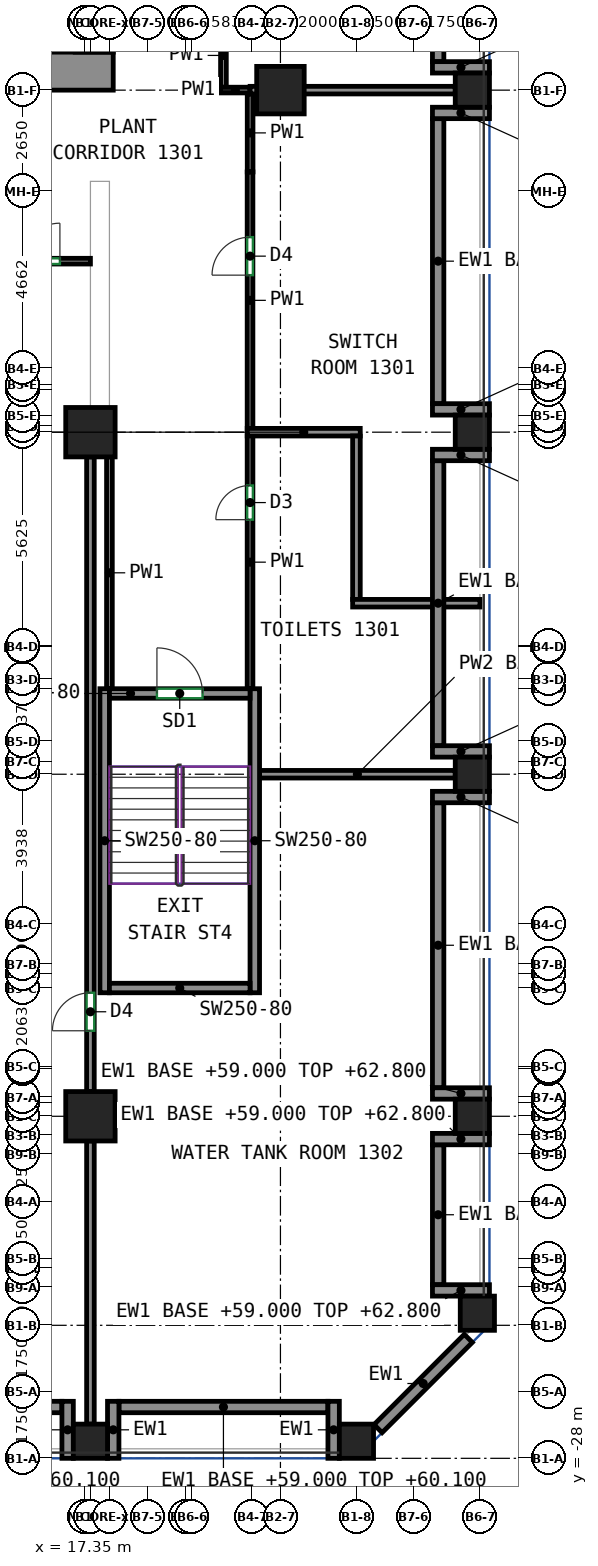
"""IFC4 building model, lengths in metres.
Left out: names, types, materials, properties, quantities, classifications, styles, units other than length and angle.
Written with IfcOpenShell. Run it as: python <this file> out.ifc"""

import sys

from ifc_helpers import new_model, si_unit, direction, frame, frame_2d, origin, origin_2d, place, context, subcontext, project, spatial, rectangle, extrude, source, transform, mapped, element, fill, save


model = new_model("IFC4")
c1 = context("Model", 3, precision=1e-05, world=origin(), true_north=direction((0.0, 1.0)))
c2 = subcontext(c1, "Body", "Model", "MODEL_VIEW")
j1 = project(units=[si_unit("LENGTHUNIT", "METRE"), si_unit("PLANEANGLEUNIT", "RADIAN")], contexts=[c1])
p1 = place(None, origin())
s1 = spatial("IfcSite", under=j1, at=p1, CompositionType="ELEMENT")
p2 = place(p1, origin())
s2 = spatial("IfcBuilding", under=s1, at=p2, CompositionType="ELEMENT")
p3 = place(p2, frame((0.0, 0.0, 59.0)))
s3 = spatial("IfcBuildingStorey", under=s2, at=p3, CompositionType="ELEMENT", Elevation=59.0)
m1 = source(origin(), c2, "Body", "SweptSolid", [
    extrude(rectangle(XDim=0.9, YDim=0.9, at=origin_2d()), origin(), (0.0, 0.0, 1.0), 2.3),
])
p4 = place(p3, frame((17.5, -27.55, 0.0), z_axis=(0.0, 0.0, 1.0), x_axis=(1.0, 0.0, 0.0)))
e1 = element("IfcColumn", 1, at=p4, inside=s3, PredefinedType="COLUMN", context=c2, shape_type="MappedRepresentation", body=[
    mapped(m1, transform((0.0, 0.0, 0.0))),
])
m2 = source(origin(), c2, "Body", "SweptSolid", [
    extrude(rectangle(XDim=1.3, YDim=1.3, at=origin_2d()), origin(), (0.0, 0.0, 1.0), 2.3),
])
for number, where, z_axis, x_axis in (
    (2, (17.5, -19.0, 0.0), (0.0, 0.0, 1.0), (1.0, 0.0, 0.0)),
    (3, (17.5, -1.0, 0.0), (0.0, 0.0, 1.0), (1.0, 0.0, 0.0)),
):
    element("IfcColumn", number, at=place(p3, frame(where, z_axis=z_axis, x_axis=x_axis)), inside=s3, PredefinedType="COLUMN", context=c2, shape_type="MappedRepresentation", body=[
        mapped(m2, transform((0.0, 0.0, 0.0))),
    ])
for number, where, z_axis, x_axis in (
    (4, (24.5, -27.55, 0.0), (0.0, 0.0, 1.0), (1.0, 0.0, 0.0)),
    (5, (27.55, -19.0, 0.0), (0.0, 0.0, 1.0), (1.0, 0.0, 0.0)),
    (6, (27.55, -10.0, 0.0), (0.0, 0.0, 1.0), (1.0, 0.0, 0.0)),
    (7, (27.55, -1.0, 0.0), (0.0, 0.0, 1.0), (1.0, 0.0, 0.0)),
):
    element("IfcColumn", number, at=place(p3, frame(where, z_axis=z_axis, x_axis=x_axis)), inside=s3, PredefinedType="COLUMN", context=c2, shape_type="MappedRepresentation", body=[
        mapped(m1, transform((0.0, 0.0, 0.0))),
    ])
m3 = source(origin(), c2, "Body", "SweptSolid", [
    extrude(rectangle(XDim=0.9, YDim=0.9, at=origin_2d()), origin(), (0.0, 0.0, 1.0), 3.8),
])
for number, where, z_axis, x_axis in (
    (8, (27.55, 8.0, 0.0), (0.0, 0.0, 1.0), (1.0, 0.0, 0.0)),
    (9, (27.682, -24.182, 0.0), (0.0, 0.0, 1.0), (1.0, 0.0, 0.0)),
):
    element("IfcColumn", number, at=place(p3, frame(where, z_axis=z_axis, x_axis=x_axis)), inside=s3, PredefinedType="COLUMN", context=c2, shape_type="MappedRepresentation", body=[
        mapped(m3, transform((0.0, 0.0, 0.0))),
    ])
m4 = source(origin(), c2, "Body", "SweptSolid", [
    extrude(rectangle(XDim=1.25, YDim=1.25, at=origin_2d()), origin(), (0.0, 0.0, 1.0), 3.8),
])
p5 = place(p3, frame((22.5, 8.0, 0.0), z_axis=(0.0, 0.0, 1.0), x_axis=(1.0, 0.0, 0.0)))
e10 = element("IfcColumn", 10, at=p5, inside=s3, PredefinedType="COLUMN", context=c2, shape_type="MappedRepresentation", body=[
    mapped(m4, transform((0.0, 0.0, 0.0))),
])
m5 = source(origin(), c2, "Body", "SweptSolid", [
    extrude(rectangle(XDim=5.63, YDim=1.0, at=frame_2d((2.815, 0.0))), origin(), (0.0, 0.0, 1.0), 3.8),
])
p6 = place(p3, frame((12.47, 8.5, 0.0), z_axis=(0.0, 0.0, 1.0), x_axis=(1.0, 0.0, 0.0)))
e11 = element("IfcWall", 11, at=p6, inside=s3, PredefinedType="SHEAR", context=c2, shape_type="MappedRepresentation", body=[
    mapped(m5, transform((0.0, 0.0, 0.0))),
])
p7 = place(p6, frame((2.18, 0.0, 0.0)))
e12 = element("IfcOpeningElement", 12, at=p7, cuts=e11, PredefinedType="OPENING", context=c2, shape_type="SweptSolid", body=[
    extrude(rectangle(XDim=1.2, YDim=2.1, at=frame_2d((0.6, 1.05))), frame((0.0, 0.51, 0.0), z_axis=(0.0, -1.0, 0.0), x_axis=(1.0, 0.0, 0.0)), (0.0, 0.0, 1.0), 1.02),
])
m6 = source(origin(), c2, "Body", "SweptSolid", [
    extrude(rectangle(XDim=8.0, YDim=0.25, at=frame_2d((4.0, 0.0))), origin(), (0.0, 0.0, 1.0), 3.8),
])
for number, where, z_axis, x_axis in (
    (13, (17.875, -15.75, 0.0), (0.0, 0.0, 1.0), (0.0, 1.0, 0.0)),
    (14, (21.825, -15.75, 0.0), (0.0, 0.0, 1.0), (0.0, 1.0, 0.0)),
):
    element("IfcWall", number, at=place(p3, frame(where, z_axis=z_axis, x_axis=x_axis)), inside=s3, PredefinedType="SHEAR", context=c2, shape_type="MappedRepresentation", body=[
        mapped(m6, transform((0.0, 0.0, 0.0))),
    ])
m7 = source(origin(), c2, "Body", "SweptSolid", [
    extrude(rectangle(XDim=3.7, YDim=0.25, at=frame_2d((1.85, 0.0))), origin(), (0.0, 0.0, 1.0), 3.8),
])
p8 = place(p3, frame((18.0, -15.625, 0.0), z_axis=(0.0, 0.0, 1.0), x_axis=(1.0, 0.0, 0.0)))
e15 = element("IfcWall", 15, at=p8, inside=s3, PredefinedType="SHEAR", context=c2, shape_type="MappedRepresentation", body=[
    mapped(m7, transform((0.0, 0.0, 0.0))),
])
p9 = place(p3, frame((18.0, -7.875, 0.0), z_axis=(0.0, 0.0, 1.0), x_axis=(1.0, 0.0, 0.0)))
e16 = element("IfcWall", 16, at=p9, inside=s3, PredefinedType="SHEAR", context=c2, shape_type="MappedRepresentation", body=[
    mapped(m7, transform((0.0, 0.0, 0.0))),
])
p10 = place(p9, frame((1.25, 0.0, 0.0)))
e17 = element("IfcOpeningElement", 17, at=p10, cuts=e16, PredefinedType="OPENING", context=c2, shape_type="SweptSolid", body=[
    extrude(rectangle(XDim=1.2, YDim=2.1, at=frame_2d((0.6, 1.05))), frame((0.0, 0.135, 0.0), z_axis=(0.0, -1.0, 0.0), x_axis=(1.0, 0.0, 0.0)), (0.0, 0.0, 1.0), 0.27),
])
m8 = source(origin(), c2, "Body", "SweptSolid", [
    extrude(rectangle(XDim=5.5, YDim=0.3, at=frame_2d((2.75, 0.0))), origin(), (0.0, 0.0, 1.0), 1.1),
])
p11 = place(p3, frame((11.25, -26.65, 0.0), z_axis=(0.0, 0.0, 1.0), x_axis=(1.0, 0.0, 0.0)))
e18 = element("IfcWall", 18, at=p11, inside=s3, PredefinedType="SOLIDWALL", context=c2, shape_type="MappedRepresentation", body=[
    mapped(m8, transform((0.0, 0.0, 0.0))),
])
m9 = source(origin(), c2, "Body", "SweptSolid", [
    extrude(rectangle(XDim=1.5, YDim=0.3, at=frame_2d((0.75, 0.0))), origin(), (0.0, 0.0, 1.0), 2.3),
])
p12 = place(p3, frame((16.9, -28.0, 0.0), z_axis=(0.0, 0.0, 1.0), x_axis=(0.0, 1.0, 0.0)))
e19 = element("IfcWall", 19, at=p12, inside=s3, PredefinedType="SOLIDWALL", context=c2, shape_type="MappedRepresentation", body=[
    mapped(m9, transform((0.0, 0.0, 0.0))),
])
p13 = place(p3, frame((18.25, -26.65, 0.0), z_axis=(0.0, 0.0, 1.0), x_axis=(1.0, 0.0, 0.0)))
e20 = element("IfcWall", 20, at=p13, inside=s3, PredefinedType="SOLIDWALL", context=c2, shape_type="MappedRepresentation", body=[
    mapped(m8, transform((0.0, 0.0, 0.0))),
])
for number, where, z_axis, x_axis in (
    (21, (18.1, -28.0, 0.0), (0.0, 0.0, 1.0), (0.0, 1.0, 0.0)),
    (22, (23.9, -28.0, 0.0), (0.0, 0.0, 1.0), (0.0, 1.0, 0.0)),
):
    element("IfcWall", number, at=place(p3, frame(where, z_axis=z_axis, x_axis=x_axis)), inside=s3, PredefinedType="SOLIDWALL", context=c2, shape_type="MappedRepresentation", body=[
        mapped(m9, transform((0.0, 0.0, 0.0))),
    ])
m10 = source(origin(), c2, "Body", "SweptSolid", [
    extrude(rectangle(XDim=3.359, YDim=0.3, at=frame_2d((1.679, 0.0))), origin(), (0.0, 0.0, 1.0), 2.3),
])
p14 = place(p3, frame((25.069, -27.219, 0.0), z_axis=(0.0, 0.0, 1.0), x_axis=(0.707143122278, 0.707070438228, 0.0)))
e23 = element("IfcWall", 23, at=p14, inside=s3, PredefinedType="SOLIDWALL", context=c2, shape_type="MappedRepresentation", body=[
    mapped(m10, transform((0.0, 0.0, 0.0))),
])
m11 = source(origin(), c2, "Body", "SweptSolid", [
    extrude(rectangle(XDim=3.682, YDim=0.3, at=frame_2d((1.841, 0.0))), origin(), (0.0, 0.0, 1.0), 1.1),
])
p15 = place(p3, frame((26.65, -23.432, 0.0), z_axis=(0.0, 0.0, 1.0), x_axis=(0.0, 1.0, 0.0)))
e24 = element("IfcWall", 24, at=p15, inside=s3, PredefinedType="SOLIDWALL", context=c2, shape_type="MappedRepresentation", body=[
    mapped(m11, transform((0.0, 0.0, 0.0))),
])
m12 = source(origin(), c2, "Body", "SweptSolid", [
    extrude(rectangle(XDim=1.5, YDim=0.3, at=frame_2d((0.75, 0.0))), origin(), (0.0, 0.0, 1.0), 3.8),
])
for number, where, z_axis, x_axis in (
    (25, (28.0, -23.582, 0.0), (0.0, 0.0, 1.0), (-1.0, 0.0, 0.0)),
    (26, (28.0, -19.6, 0.0), (0.0, 0.0, 1.0), (-1.0, 0.0, 0.0)),
):
    element("IfcWall", number, at=place(p3, frame(where, z_axis=z_axis, x_axis=x_axis)), inside=s3, PredefinedType="SOLIDWALL", context=c2, shape_type="MappedRepresentation", body=[
        mapped(m12, transform((0.0, 0.0, 0.0))),
    ])
m13 = source(origin(), c2, "Body", "SweptSolid", [
    extrude(rectangle(XDim=7.5, YDim=0.3, at=frame_2d((3.75, 0.0))), origin(), (0.0, 0.0, 1.0), 1.1),
])
p16 = place(p3, frame((26.65, -18.25, 0.0), z_axis=(0.0, 0.0, 1.0), x_axis=(0.0, 1.0, 0.0)))
e27 = element("IfcWall", 27, at=p16, inside=s3, PredefinedType="SOLIDWALL", context=c2, shape_type="MappedRepresentation", body=[
    mapped(m13, transform((0.0, 0.0, 0.0))),
])
for number, where, z_axis, x_axis in (
    (28, (28.0, -18.4, 0.0), (0.0, 0.0, 1.0), (-1.0, 0.0, 0.0)),
    (29, (28.0, -10.6, 0.0), (0.0, 0.0, 1.0), (-1.0, 0.0, 0.0)),
):
    element("IfcWall", number, at=place(p3, frame(where, z_axis=z_axis, x_axis=x_axis)), inside=s3, PredefinedType="SOLIDWALL", context=c2, shape_type="MappedRepresentation", body=[
        mapped(m12, transform((0.0, 0.0, 0.0))),
    ])
p17 = place(p3, frame((26.65, -9.25, 0.0), z_axis=(0.0, 0.0, 1.0), x_axis=(0.0, 1.0, 0.0)))
e30 = element("IfcWall", 30, at=p17, inside=s3, PredefinedType="SOLIDWALL", context=c2, shape_type="MappedRepresentation", body=[
    mapped(m13, transform((0.0, 0.0, 0.0))),
])
for number, where, z_axis, x_axis in (
    (31, (28.0, -9.4, 0.0), (0.0, 0.0, 1.0), (-1.0, 0.0, 0.0)),
    (32, (28.0, -1.6, 0.0), (0.0, 0.0, 1.0), (-1.0, 0.0, 0.0)),
):
    element("IfcWall", number, at=place(p3, frame(where, z_axis=z_axis, x_axis=x_axis)), inside=s3, PredefinedType="SOLIDWALL", context=c2, shape_type="MappedRepresentation", body=[
        mapped(m12, transform((0.0, 0.0, 0.0))),
    ])
p18 = place(p3, frame((26.65, -0.25, 0.0), z_axis=(0.0, 0.0, 1.0), x_axis=(0.0, 1.0, 0.0)))
e33 = element("IfcWall", 33, at=p18, inside=s3, PredefinedType="SOLIDWALL", context=c2, shape_type="MappedRepresentation", body=[
    mapped(m13, transform((0.0, 0.0, 0.0))),
])
for number, where, z_axis, x_axis in (
    (34, (28.0, -0.4, 0.0), (0.0, 0.0, 1.0), (-1.0, 0.0, 0.0)),
    (35, (28.0, 7.4, 0.0), (0.0, 0.0, 1.0), (-1.0, 0.0, 0.0)),
):
    element("IfcWall", number, at=place(p3, frame(where, z_axis=z_axis, x_axis=x_axis)), inside=s3, PredefinedType="SOLIDWALL", context=c2, shape_type="MappedRepresentation", body=[
        mapped(m12, transform((0.0, 0.0, 0.0))),
    ])
m14 = source(origin(), c2, "Body", "SweptSolid", [
    extrude(rectangle(XDim=15.0, YDim=0.3, at=frame_2d((7.5, 0.0))), origin(), (0.0, 0.0, 1.0), 1.1),
])
p19 = place(p3, frame((26.65, 8.75, 0.0), z_axis=(0.0, 0.0, 1.0), x_axis=(0.0, 1.0, 0.0)))
e36 = element("IfcWall", 36, at=p19, inside=s3, PredefinedType="SOLIDWALL", context=c2, shape_type="MappedRepresentation", body=[
    mapped(m14, transform((0.0, 0.0, 0.0))),
])
p20 = place(p3, frame((28.0, 8.6, 0.0), z_axis=(0.0, 0.0, 1.0), x_axis=(-1.0, 0.0, 0.0)))
e37 = element("IfcWall", 37, at=p20, inside=s3, PredefinedType="SOLIDWALL", context=c2, shape_type="MappedRepresentation", body=[
    mapped(m12, transform((0.0, 0.0, 0.0))),
])
p21 = place(p3, frame((6.925, 3.5, 0.0), z_axis=(0.0, 0.0, 1.0), x_axis=(1.0, 0.0, 0.0)))
e38 = element("IfcWall", 38, at=p21, inside=s3, PredefinedType="PARTITIONING", context=c2, shape_type="SweptSolid", body=[
    extrude(rectangle(XDim=10.575, YDim=0.15, at=frame_2d((5.288, 0.0))), origin(), (0.0, 0.0, 1.0), 3.8),
])
p22 = place(p21, frame((8.772, 0.0, 0.0)))
e39 = element("IfcOpeningElement", 39, at=p22, cuts=e38, PredefinedType="OPENING", context=c2, shape_type="SweptSolid", body=[
    extrude(rectangle(XDim=1.0, YDim=2.1, at=frame_2d((0.5, 1.05))), frame((0.0, 0.085, 0.0), z_axis=(0.0, -1.0, 0.0), x_axis=(1.0, 0.0, 0.0)), (0.0, 0.0, 1.0), 0.17),
])
p23 = place(p3, frame((18.0, -1.65, 0.0), z_axis=(0.0, 0.0, 1.0), x_axis=(0.0, -1.0, 0.0)))
e40 = element("IfcWall", 40, at=p23, inside=s3, PredefinedType="PARTITIONING", context=c2, shape_type="SweptSolid", body=[
    extrude(rectangle(XDim=6.1, YDim=0.15, at=frame_2d((3.05, 0.0))), origin(), (0.0, 0.0, 1.0), 3.8),
])
p24 = place(p3, frame((21.7, -7.75, 0.0), z_axis=(0.0, 0.0, 1.0), x_axis=(0.0, 1.0, 0.0)))
e41 = element("IfcWall", 41, at=p24, inside=s3, PredefinedType="PARTITIONING", context=c2, shape_type="SweptSolid", body=[
    extrude(rectangle(XDim=6.66, YDim=0.15, at=frame_2d((3.33, 0.0))), origin(), (0.0, 0.0, 1.0), 3.8),
])
p25 = place(p24, frame((4.448, 0.0, 0.0)))
e42 = element("IfcOpeningElement", 42, at=p25, cuts=e41, PredefinedType="OPENING", context=c2, shape_type="SweptSolid", body=[
    extrude(rectangle(XDim=0.9, YDim=2.1, at=frame_2d((0.45, 1.05))), frame((0.0, 0.085, 0.0), z_axis=(0.0, -1.0, 0.0), x_axis=(1.0, 0.0, 0.0)), (0.0, 0.0, 1.0), 0.17),
])
p26 = place(p3, frame((21.702, 5.848, 0.0), z_axis=(0.0, 0.0, 1.0), x_axis=(0.0, 1.0, 0.0)))
e43 = element("IfcWall", 43, at=p26, inside=s3, PredefinedType="PARTITIONING", context=c2, shape_type="SweptSolid", body=[
    extrude(rectangle(XDim=2.054, YDim=0.15, at=frame_2d((1.027, 0.0))), origin(), (0.0, 0.0, 1.0), 3.8),
])
p27 = place(p3, frame((21.7, -0.91, 0.0), z_axis=(0.0, 0.0, 1.0), x_axis=(0.0, 1.0, 0.0)))
e44 = element("IfcWall", 44, at=p27, inside=s3, PredefinedType="PARTITIONING", context=c2, shape_type="SweptSolid", body=[
    extrude(rectangle(XDim=6.758, YDim=0.15, at=frame_2d((3.379, 0.0))), origin(), (0.0, 0.0, 1.0), 3.8),
])
p28 = place(p27, frame((4.042, 0.0, 0.0)))
e45 = element("IfcOpeningElement", 45, at=p28, cuts=e44, PredefinedType="OPENING", context=c2, shape_type="SweptSolid", body=[
    extrude(rectangle(XDim=1.0, YDim=2.1, at=frame_2d((0.5, 1.05))), frame((0.0, 0.085, 0.0), z_axis=(0.0, -1.0, 0.0), x_axis=(1.0, 0.0, 0.0)), (0.0, 0.0, 1.0), 0.17),
])
p29 = place(p3, frame((21.0, 8.077, 0.0), z_axis=(0.0, 0.0, 1.0), x_axis=(0.0, 1.0, 0.0)))
e46 = element("IfcWall", 46, at=p29, inside=s3, PredefinedType="PARTITIONING", context=c2, shape_type="SweptSolid", body=[
    extrude(rectangle(XDim=1.673, YDim=0.15, at=frame_2d((0.836, 0.0))), origin(), (0.0, 0.0, 1.0), 3.8),
])
p30 = place(p3, frame((21.702, 8.002, 0.0), z_axis=(0.0, 0.0, 1.0), x_axis=(-1.0, 0.0, 0.0)))
e47 = element("IfcWall", 47, at=p30, inside=s3, PredefinedType="PARTITIONING", context=c2, shape_type="SweptSolid", body=[
    extrude(rectangle(XDim=0.777, YDim=0.15, at=frame_2d((0.388, 0.0))), origin(), (0.0, 0.0, 1.0), 3.8),
])
p31 = place(p3, frame((17.5, -18.35, 0.0), z_axis=(0.0, 0.0, 1.0), x_axis=(0.0, 1.0, 0.0)))
e48 = element("IfcWall", 48, at=p31, inside=s3, PredefinedType="PARTITIONING", context=c2, shape_type="SweptSolid", body=[
    extrude(rectangle(XDim=16.7, YDim=0.2, at=frame_2d((8.35, 0.0))), origin(), (0.0, 0.0, 1.0), 3.8),
])
p32 = place(p31, frame((1.6, 0.0, 0.0)))
e49 = element("IfcOpeningElement", 49, at=p32, cuts=e48, PredefinedType="OPENING", context=c2, shape_type="SweptSolid", body=[
    extrude(rectangle(XDim=1.0, YDim=2.1, at=frame_2d((0.5, 1.05))), frame((0.0, 0.11, 0.0), z_axis=(0.0, -1.0, 0.0), x_axis=(1.0, 0.0, 0.0)), (0.0, 0.0, 1.0), 0.22),
])
p33 = place(p3, frame((17.5, -27.1, 0.0), z_axis=(0.0, 0.0, 1.0), x_axis=(0.0, 1.0, 0.0)))
e50 = element("IfcWall", 50, at=p33, inside=s3, PredefinedType="PARTITIONING", context=c2, shape_type="SweptSolid", body=[
    extrude(rectangle(XDim=7.45, YDim=0.2, at=frame_2d((3.725, 0.0))), origin(), (0.0, 0.0, 1.0), 3.8),
])
p34 = place(p3, frame((21.95, -10.0, 0.0), z_axis=(0.0, 0.0, 1.0), x_axis=(1.0, 0.0, 0.0)))
e51 = element("IfcWall", 51, at=p34, inside=s3, PredefinedType="PARTITIONING", context=c2, shape_type="SweptSolid", body=[
    extrude(rectangle(XDim=5.15, YDim=0.2, at=frame_2d((2.575, 0.0))), origin(), (0.0, 0.0, 1.0), 2.3),
])
p35 = place(p3, frame((21.626, -1.0, 0.0), z_axis=(0.0, 0.0, 1.0), x_axis=(1.0, 0.0, 0.0)))
e52 = element("IfcWall", 52, at=p35, inside=s3, PredefinedType="PARTITIONING", context=c2, shape_type="SweptSolid", body=[
    extrude(rectangle(XDim=2.974, YDim=0.2, at=frame_2d((1.487, 0.0))), origin(), (0.0, 0.0, 1.0), 2.3),
])
p36 = place(p3, frame((24.5, -5.4, 0.0), z_axis=(0.0, 0.0, 1.0), x_axis=(0.0, 1.0, 0.0)))
e53 = element("IfcWall", 53, at=p36, inside=s3, PredefinedType="PARTITIONING", context=c2, shape_type="SweptSolid", body=[
    extrude(rectangle(XDim=4.3, YDim=0.2, at=frame_2d((2.15, 0.0))), origin(), (0.0, 0.0, 1.0), 3.8),
])
p37 = place(p3, frame((24.4, -5.5, 0.0), z_axis=(0.0, 0.0, 1.0), x_axis=(1.0, 0.0, 0.0)))
e54 = element("IfcWall", 54, at=p37, inside=s3, PredefinedType="PARTITIONING", context=c2, shape_type="SweptSolid", body=[
    extrude(rectangle(XDim=2.13, YDim=0.2, at=frame_2d((1.065, 0.0))), origin(), (0.0, 0.0, 1.0), 3.8),
])
p38 = place(p3, frame((26.77, -5.5, 0.0), z_axis=(0.0, 0.0, 1.0), x_axis=(1.0, 0.0, 0.0)))
e55 = element("IfcWall", 55, at=p38, inside=s3, PredefinedType="PARTITIONING", context=c2, shape_type="SweptSolid", body=[
    extrude(rectangle(XDim=0.98, YDim=0.2, at=frame_2d((0.49, 0.0))), origin(), (0.0, 0.0, 1.0), 3.8),
])
p39 = place(p3, frame((21.702, 8.0, 0.0), z_axis=(0.0, 0.0, 1.0), x_axis=(1.0, 0.0, 0.0)))
e56 = element("IfcWall", 56, at=p39, inside=s3, PredefinedType="PARTITIONING", context=c2, shape_type="SweptSolid", body=[
    extrude(rectangle(XDim=5.398, YDim=0.2, at=frame_2d((2.699, 0.0))), origin(), (0.0, 0.0, 1.0), 3.8),
])
p40 = place(p10, origin())
e57 = element("IfcDoor", 57, at=p40, inside=s3, OperationType="DOUBLE_DOOR_SINGLE_SWING", PredefinedType="DOOR", context=c2, shape_type="SweptSolid", body=[
    extrude(rectangle(XDim=1.2, YDim=2.1, at=frame_2d((0.6, 1.05))), frame((0.0, 0.025, 0.0), z_axis=(0.0, -1.0, 0.0), x_axis=(1.0, 0.0, 0.0)), (0.0, 0.0, 1.0), 0.05),
])
fill(e17, e57)
p41 = place(p32, origin())
e58 = element("IfcDoor", 58, at=p41, inside=s3, OperationType="SINGLE_SWING_LEFT", PredefinedType="DOOR", context=c2, shape_type="SweptSolid", body=[
    extrude(rectangle(XDim=1.0, YDim=2.1, at=frame_2d((0.5, 1.05))), frame((0.0, 0.025, 0.0), z_axis=(0.0, -1.0, 0.0), x_axis=(1.0, 0.0, 0.0)), (0.0, 0.0, 1.0), 0.05),
])
fill(e49, e58)
p42 = place(p25, origin())
e59 = element("IfcDoor", 59, at=p42, inside=s3, OperationType="SINGLE_SWING_LEFT", PredefinedType="DOOR", context=c2, shape_type="SweptSolid", body=[
    extrude(rectangle(XDim=0.9, YDim=2.1, at=frame_2d((0.45, 1.05))), frame((0.0, 0.025, 0.0), z_axis=(0.0, -1.0, 0.0), x_axis=(1.0, 0.0, 0.0)), (0.0, 0.0, 1.0), 0.05),
])
fill(e42, e59)
p43 = place(p22, origin())
e60 = element("IfcDoor", 60, at=p43, inside=s3, OperationType="SINGLE_SWING_RIGHT", PredefinedType="DOOR", context=c2, shape_type="SweptSolid", body=[
    extrude(rectangle(XDim=1.0, YDim=2.1, at=frame_2d((0.5, 1.05))), frame((0.0, 0.025, 0.0), z_axis=(0.0, -1.0, 0.0), x_axis=(1.0, 0.0, 0.0)), (0.0, 0.0, 1.0), 0.05),
])
fill(e39, e60)
p44 = place(p28, origin())
e61 = element("IfcDoor", 61, at=p44, inside=s3, OperationType="SINGLE_SWING_LEFT", PredefinedType="DOOR", context=c2, shape_type="SweptSolid", body=[
    extrude(rectangle(XDim=1.0, YDim=2.1, at=frame_2d((0.5, 1.05))), frame((0.0, 0.025, 0.0), z_axis=(0.0, -1.0, 0.0), x_axis=(1.0, 0.0, 0.0)), (0.0, 0.0, 1.0), 0.05),
])
fill(e45, e61)
save(model, sys.argv[1])
